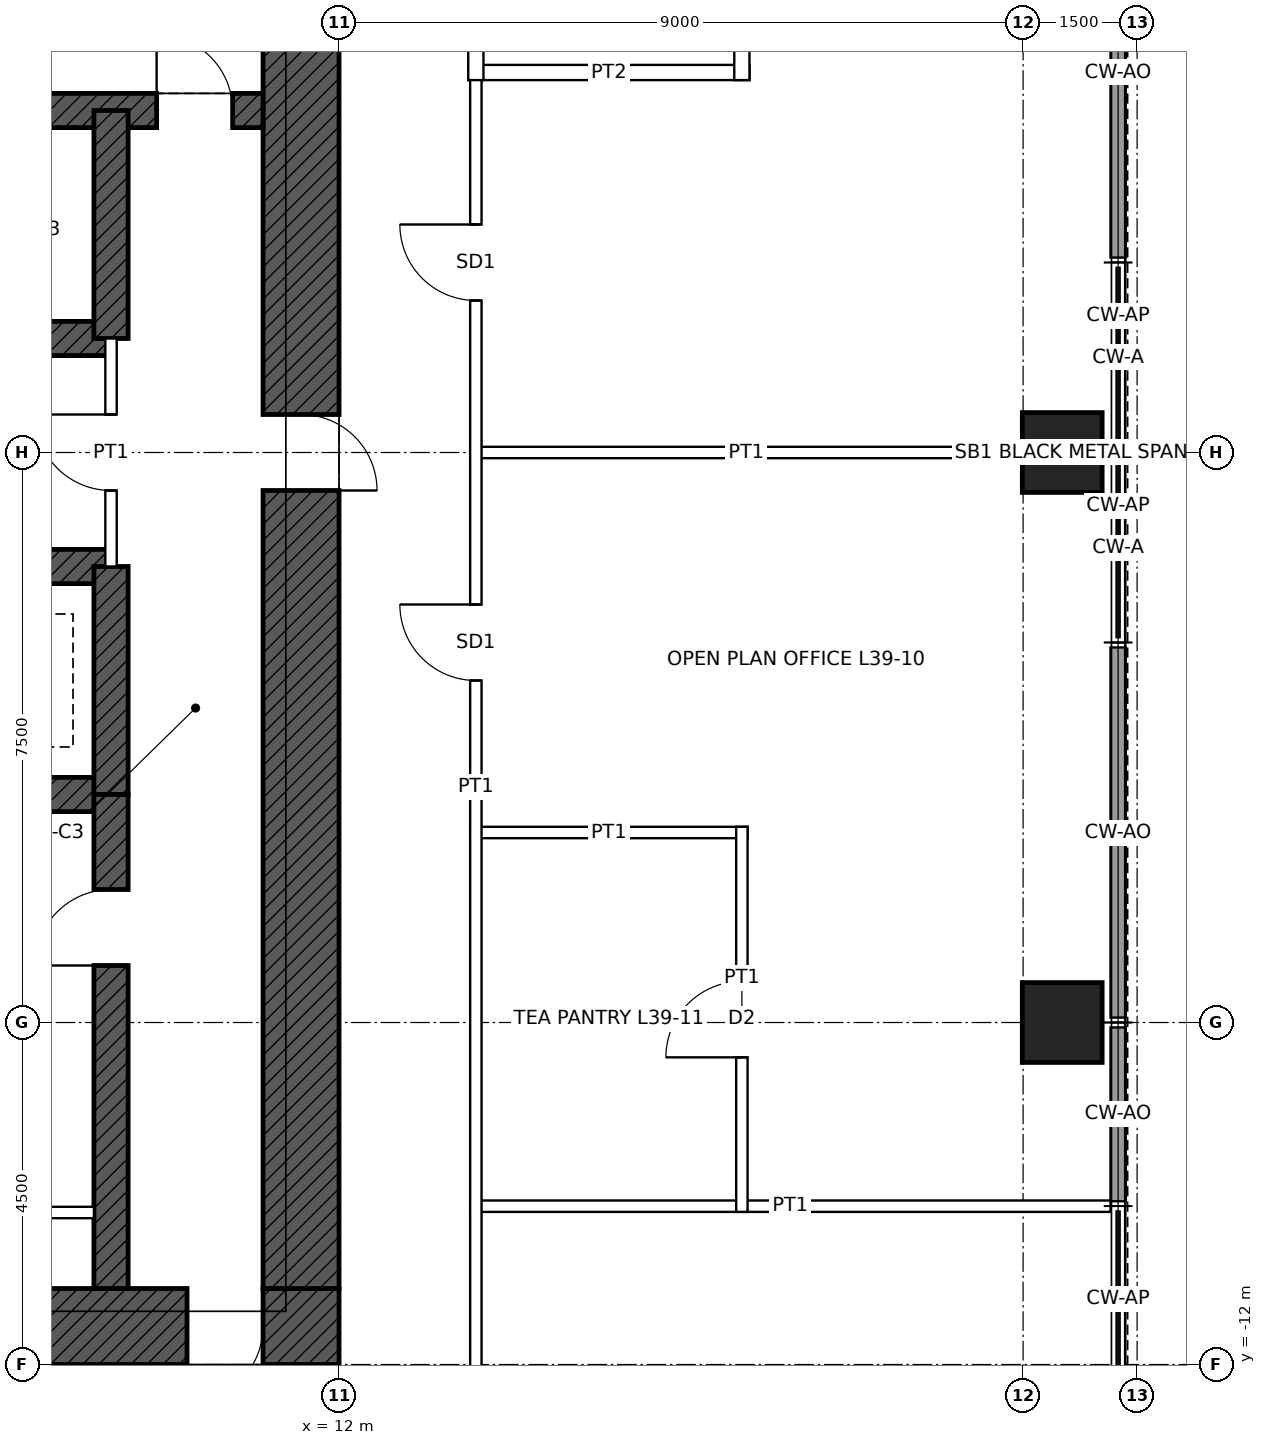
"""IFC4 building model, lengths in metres.
Left out: names, types, materials, properties, quantities, classifications, styles, units other than length and angle.
Written with IfcOpenShell. Run it as: python <this file> out.ifc"""

import sys

from ifc_helpers import new_model, si_unit, direction, frame, frame_2d, origin, origin_2d, place, context, subcontext, project, spatial, rectangle, hollow_rectangle, extrude, element, fill, save


model = new_model("IFC4")
c1 = context("Model", 3, precision=1e-05, world=origin(), true_north=direction((0.0, 1.0)))
c2 = subcontext(c1, "Body", "Model", "MODEL_VIEW")
j1 = project(units=[si_unit("LENGTHUNIT", "METRE"), si_unit("PLANEANGLEUNIT", "RADIAN")], contexts=[c1])
p1 = place(None, origin())
s1 = spatial("IfcSite", under=j1, at=p1, CompositionType="ELEMENT")
p2 = place(p1, origin())
s2 = spatial("IfcBuilding", under=s1, at=p2, CompositionType="ELEMENT")
p3 = place(p2, frame((0.0, 0.0, 189.9)))
s3 = spatial("IfcBuildingStorey", under=s2, at=p3, CompositionType="ELEMENT", Elevation=189.9)
for number, where, z_axis, x_axis in (
    (1, (21.515, 0.0, 0.0), (0.0, 0.0, 1.0), (1.0, 0.0, 0.0)),
    (2, (21.515, -7.5, 0.0), (0.0, 0.0, 1.0), (1.0, 0.0, 0.0)),
):
    element("IfcColumn", number, at=place(p3, frame(where, z_axis=z_axis, x_axis=x_axis)), inside=s3, PredefinedType="COLUMN", context=c2, shape_type="SweptSolid", body=[
        extrude(hollow_rectangle(XDim=1.05, YDim=1.05, WallThickness=0.07, at=origin_2d()), origin(), (0.0, 0.0, 1.0), 4.0),
    ])
p4 = place(p3, frame((12.0, -11.5, 0.0), z_axis=(0.0, 0.0, 1.0), x_axis=(-1.0, 0.0, 0.0)))
e3 = element("IfcWall", 3, at=p4, inside=s3, PredefinedType="SHEAR", context=c2, shape_type="SweptSolid", body=[
    extrude(rectangle(XDim=24.0, YDim=1.0, at=frame_2d((12.0, 0.0))), origin(), (0.0, 0.0, 1.0), 4.0),
])
p5 = place(p4, frame((11.5, 0.0, 0.0)))
e4 = element("IfcOpeningElement", 4, at=p5, cuts=e3, PredefinedType="OPENING", context=c2, shape_type="SweptSolid", body=[
    extrude(rectangle(XDim=1.0, YDim=2.1, at=frame_2d((0.5, 1.05))), frame((0.0, 0.51, 0.0), z_axis=(0.0, -1.0, 0.0), x_axis=(1.0, 0.0, 0.0)), (0.0, 0.0, 1.0), 1.02),
])
p6 = place(p4, frame((1.0, 0.0, 0.0)))
e5 = element("IfcOpeningElement", 5, at=p6, cuts=e3, PredefinedType="OPENING", context=c2, shape_type="SweptSolid", body=[
    extrude(rectangle(XDim=1.0, YDim=2.4, at=frame_2d((0.5, 1.2))), frame((0.0, 0.51, 0.0), z_axis=(0.0, -1.0, 0.0), x_axis=(1.0, 0.0, 0.0)), (0.0, 0.0, 1.0), 1.02),
])
p7 = place(p3, frame((11.5, 11.0, 0.0), z_axis=(0.0, 0.0, 1.0), x_axis=(0.0, -1.0, 0.0)))
e6 = element("IfcWall", 6, at=p7, inside=s3, PredefinedType="SHEAR", context=c2, shape_type="SweptSolid", body=[
    extrude(rectangle(XDim=22.0, YDim=1.0, at=frame_2d((11.0, 0.0))), origin(), (0.0, 0.0, 1.0), 4.0),
])
p8 = place(p7, frame((10.5, 0.0, 0.0)))
e7 = element("IfcOpeningElement", 7, at=p8, cuts=e6, PredefinedType="OPENING", context=c2, shape_type="SweptSolid", body=[
    extrude(rectangle(XDim=1.0, YDim=2.4, at=frame_2d((0.5, 1.2))), frame((0.0, 0.51, 0.0), z_axis=(0.0, -1.0, 0.0), x_axis=(1.0, 0.0, 0.0)), (0.0, 0.0, 1.0), 1.02),
])
p9 = place(p3, frame((-11.0, 4.5, 0.0), z_axis=(0.0, 0.0, 1.0), x_axis=(1.0, 0.0, 0.0)))
e8 = element("IfcWall", 8, at=p9, inside=s3, PredefinedType="SHEAR", context=c2, shape_type="SweptSolid", body=[
    extrude(rectangle(XDim=22.0, YDim=0.45, at=frame_2d((11.0, 0.0))), origin(), (0.0, 0.0, 1.0), 4.0),
])
p10 = place(p9, frame((0.4, 0.0, 0.0)))
e9 = element("IfcOpeningElement", 9, at=p10, cuts=e8, PredefinedType="OPENING", context=c2, shape_type="SweptSolid", body=[
    extrude(rectangle(XDim=1.0, YDim=2.1, at=frame_2d((0.5, 1.05))), frame((0.0, 0.235, 0.0), z_axis=(0.0, -1.0, 0.0), x_axis=(1.0, 0.0, 0.0)), (0.0, 0.0, 1.0), 0.47),
])
p11 = place(p9, frame((20.6, 0.0, 0.0)))
e10 = element("IfcOpeningElement", 10, at=p11, cuts=e8, PredefinedType="OPENING", context=c2, shape_type="SweptSolid", body=[
    extrude(rectangle(XDim=1.0, YDim=2.1, at=frame_2d((0.5, 1.05))), frame((0.0, 0.235, 0.0), z_axis=(0.0, -1.0, 0.0), x_axis=(1.0, 0.0, 0.0)), (0.0, 0.0, 1.0), 0.47),
])
p12 = place(p3, frame((-9.0, 1.5, 0.0), z_axis=(0.0, 0.0, 1.0), x_axis=(1.0, 0.0, 0.0)))
e11 = element("IfcWall", 11, at=p12, inside=s3, PredefinedType="SHEAR", context=c2, shape_type="SweptSolid", body=[
    extrude(rectangle(XDim=18.0, YDim=0.45, at=frame_2d((9.0, 0.0))), origin(), (0.0, 0.0, 1.0), 4.0),
])
p13 = place(p12, frame((0.95, 0.0, 0.0)))
e12 = element("IfcOpeningElement", 12, at=p13, cuts=e11, PredefinedType="OPENING", context=c2, shape_type="SweptSolid", body=[
    extrude(rectangle(XDim=1.1, YDim=2.1, at=frame_2d((0.55, 1.05))), frame((0.0, 0.235, 0.0), z_axis=(0.0, -1.0, 0.0), x_axis=(1.0, 0.0, 0.0)), (0.0, 0.0, 1.0), 0.47),
])
p14 = place(p12, frame((3.95, 0.0, 0.0)))
e13 = element("IfcOpeningElement", 13, at=p14, cuts=e11, PredefinedType="OPENING", context=c2, shape_type="SweptSolid", body=[
    extrude(rectangle(XDim=1.1, YDim=2.1, at=frame_2d((0.55, 1.05))), frame((0.0, 0.235, 0.0), z_axis=(0.0, -1.0, 0.0), x_axis=(1.0, 0.0, 0.0)), (0.0, 0.0, 1.0), 0.47),
])
p15 = place(p12, frame((6.95, 0.0, 0.0)))
e14 = element("IfcOpeningElement", 14, at=p15, cuts=e11, PredefinedType="OPENING", context=c2, shape_type="SweptSolid", body=[
    extrude(rectangle(XDim=1.1, YDim=2.1, at=frame_2d((0.55, 1.05))), frame((0.0, 0.235, 0.0), z_axis=(0.0, -1.0, 0.0), x_axis=(1.0, 0.0, 0.0)), (0.0, 0.0, 1.0), 0.47),
])
p16 = place(p12, frame((9.95, 0.0, 0.0)))
e15 = element("IfcOpeningElement", 15, at=p16, cuts=e11, PredefinedType="OPENING", context=c2, shape_type="SweptSolid", body=[
    extrude(rectangle(XDim=1.1, YDim=2.1, at=frame_2d((0.55, 1.05))), frame((0.0, 0.235, 0.0), z_axis=(0.0, -1.0, 0.0), x_axis=(1.0, 0.0, 0.0)), (0.0, 0.0, 1.0), 0.47),
])
p17 = place(p12, frame((12.95, 0.0, 0.0)))
e16 = element("IfcOpeningElement", 16, at=p17, cuts=e11, PredefinedType="OPENING", context=c2, shape_type="SweptSolid", body=[
    extrude(rectangle(XDim=1.1, YDim=2.1, at=frame_2d((0.55, 1.05))), frame((0.0, 0.235, 0.0), z_axis=(0.0, -1.0, 0.0), x_axis=(1.0, 0.0, 0.0)), (0.0, 0.0, 1.0), 0.47),
])
p18 = place(p12, frame((15.95, 0.0, 0.0)))
e17 = element("IfcOpeningElement", 17, at=p18, cuts=e11, PredefinedType="OPENING", context=c2, shape_type="SweptSolid", body=[
    extrude(rectangle(XDim=1.1, YDim=2.1, at=frame_2d((0.55, 1.05))), frame((0.0, 0.235, 0.0), z_axis=(0.0, -1.0, 0.0), x_axis=(1.0, 0.0, 0.0)), (0.0, 0.0, 1.0), 0.47),
])
p19 = place(p3, frame((-9.0, -1.5, 0.0), z_axis=(0.0, 0.0, 1.0), x_axis=(1.0, 0.0, 0.0)))
e18 = element("IfcWall", 18, at=p19, inside=s3, PredefinedType="SHEAR", context=c2, shape_type="SweptSolid", body=[
    extrude(rectangle(XDim=18.0, YDim=0.45, at=frame_2d((9.0, 0.0))), origin(), (0.0, 0.0, 1.0), 4.0),
])
p20 = place(p19, frame((0.95, 0.0, 0.0)))
e19 = element("IfcOpeningElement", 19, at=p20, cuts=e18, PredefinedType="OPENING", context=c2, shape_type="SweptSolid", body=[
    extrude(rectangle(XDim=1.1, YDim=2.1, at=frame_2d((0.55, 1.05))), frame((0.0, 0.235, 0.0), z_axis=(0.0, -1.0, 0.0), x_axis=(1.0, 0.0, 0.0)), (0.0, 0.0, 1.0), 0.47),
])
p21 = place(p19, frame((3.95, 0.0, 0.0)))
e20 = element("IfcOpeningElement", 20, at=p21, cuts=e18, PredefinedType="OPENING", context=c2, shape_type="SweptSolid", body=[
    extrude(rectangle(XDim=1.1, YDim=2.1, at=frame_2d((0.55, 1.05))), frame((0.0, 0.235, 0.0), z_axis=(0.0, -1.0, 0.0), x_axis=(1.0, 0.0, 0.0)), (0.0, 0.0, 1.0), 0.47),
])
p22 = place(p19, frame((6.95, 0.0, 0.0)))
e21 = element("IfcOpeningElement", 21, at=p22, cuts=e18, PredefinedType="OPENING", context=c2, shape_type="SweptSolid", body=[
    extrude(rectangle(XDim=1.1, YDim=2.1, at=frame_2d((0.55, 1.05))), frame((0.0, 0.235, 0.0), z_axis=(0.0, -1.0, 0.0), x_axis=(1.0, 0.0, 0.0)), (0.0, 0.0, 1.0), 0.47),
])
p23 = place(p3, frame((-9.0, -4.5, 0.0), z_axis=(0.0, 0.0, 1.0), x_axis=(1.0, 0.0, 0.0)))
e22 = element("IfcWall", 22, at=p23, inside=s3, PredefinedType="SHEAR", context=c2, shape_type="SweptSolid", body=[
    extrude(rectangle(XDim=18.0, YDim=0.45, at=frame_2d((9.0, 0.0))), origin(), (0.0, 0.0, 1.0), 4.0),
])
for number, where, z_axis, x_axis in (
    (23, (9.0, 1.5, 0.0), (0.0, 0.0, 1.0), (0.0, 1.0, 0.0)),
    (24, (9.0, -4.5, 0.0), (0.0, 0.0, 1.0), (0.0, 1.0, 0.0)),
):
    element("IfcWall", number, at=place(p3, frame(where, z_axis=z_axis, x_axis=x_axis)), inside=s3, PredefinedType="SHEAR", context=c2, shape_type="SweptSolid", body=[
        extrude(rectangle(XDim=3.0, YDim=0.45, at=frame_2d((1.5, 0.0))), origin(), (0.0, 0.0, 1.0), 4.0),
    ])
p24 = place(p3, frame((9.0, -11.0, 0.0), z_axis=(0.0, 0.0, 1.0), x_axis=(0.0, 1.0, 0.0)))
e25 = element("IfcWall", 25, at=p24, inside=s3, PredefinedType="SHEAR", context=c2, shape_type="SweptSolid", body=[
    extrude(rectangle(XDim=6.5, YDim=0.45, at=frame_2d((3.25, 0.0))), origin(), (0.0, 0.0, 1.0), 4.0),
])
p25 = place(p24, frame((4.25, 0.0, 0.0)))
e26 = element("IfcOpeningElement", 26, at=p25, cuts=e25, PredefinedType="OPENING", context=c2, shape_type="SweptSolid", body=[
    extrude(rectangle(XDim=1.0, YDim=2.1, at=frame_2d((0.5, 1.05))), frame((0.0, 0.235, 0.0), z_axis=(0.0, -1.0, 0.0), x_axis=(1.0, 0.0, 0.0)), (0.0, 0.0, 1.0), 0.47),
])
for number, where, z_axis, x_axis in (
    (27, (22.25, 7.435, 0.0), (0.0, 0.0, 1.0), (0.0, -1.0, 0.0)),
    (28, (22.25, 4.968, 0.0), (0.0, 0.0, 1.0), (0.0, -1.0, 0.0)),
    (29, (22.25, -2.565, 0.0), (0.0, 0.0, 1.0), (0.0, -1.0, 0.0)),
    (30, (22.25, -5.032, 0.0), (0.0, 0.0, 1.0), (0.0, -1.0, 0.0)),
):
    element("IfcWall", number, at=place(p3, frame(where, z_axis=z_axis, x_axis=x_axis)), inside=s3, PredefinedType="SOLIDWALL", context=c2, shape_type="SweptSolid", body=[
        extrude(rectangle(XDim=2.403, YDim=0.2, at=frame_2d((1.201, 0.0))), origin(), (0.0, 0.0, 1.0), 3.85),
    ])
p26 = place(p3, frame((22.25, -7.565, 0.0), z_axis=(0.0, 0.0, 1.0), x_axis=(0.0, -1.0, 0.0)))
e31 = element("IfcWall", 31, at=p26, inside=s3, PredefinedType="SOLIDWALL", context=c2, shape_type="SweptSolid", body=[
    extrude(rectangle(XDim=2.287, YDim=0.2, at=frame_2d((1.144, 0.0))), origin(), (0.0, 0.0, 1.0), 3.85),
])
p27 = place(p3, frame((13.725, -9.917, 0.0), z_axis=(0.0, 0.0, 1.0), x_axis=(1.0, 0.0, 0.0)))
e32 = element("IfcWall", 32, at=p27, inside=s3, PredefinedType="PARTITIONING", context=c2, shape_type="SweptSolid", body=[
    extrude(rectangle(XDim=8.425, YDim=0.15, at=frame_2d((4.212, 0.0))), origin(), (0.0, 0.0, 1.0), 3.85),
])
p28 = place(p3, frame((13.725, -5.0, 0.0), z_axis=(0.0, 0.0, 1.0), x_axis=(1.0, 0.0, 0.0)))
e33 = element("IfcWall", 33, at=p28, inside=s3, PredefinedType="PARTITIONING", context=c2, shape_type="SweptSolid", body=[
    extrude(rectangle(XDim=3.65, YDim=0.15, at=frame_2d((1.825, 0.0))), origin(), (0.0, 0.0, 1.0), 3.85),
])
p29 = place(p3, frame((13.725, 0.0, 0.0), z_axis=(0.0, 0.0, 1.0), x_axis=(1.0, 0.0, 0.0)))
e34 = element("IfcWall", 34, at=p29, inside=s3, PredefinedType="PARTITIONING", context=c2, shape_type="SweptSolid", body=[
    extrude(rectangle(XDim=7.265, YDim=0.15, at=frame_2d((3.632, 0.0))), origin(), (0.0, 0.0, 1.0), 3.238),
])
p30 = place(p3, frame((13.7, 5.0, 0.0), z_axis=(0.0, 0.0, 1.0), x_axis=(1.0, 0.0, 0.0)))
e35 = element("IfcWall", 35, at=p30, inside=s3, PredefinedType="PARTITIONING", context=c2, shape_type="SweptSolid", body=[
    extrude(rectangle(XDim=3.7, YDim=0.2, at=frame_2d((1.85, 0.0))), origin(), (0.0, 0.0, 1.0), 3.85),
])
p31 = place(p3, frame((13.8, -13.875, 0.0), z_axis=(0.0, 0.0, 1.0), x_axis=(0.0, 1.0, 0.0)))
e36 = element("IfcWall", 36, at=p31, inside=s3, PredefinedType="PARTITIONING", context=c2, shape_type="SweptSolid", body=[
    extrude(rectangle(XDim=18.95, YDim=0.15, at=frame_2d((9.475, 0.0))), origin(), (0.0, 0.0, 1.0), 3.85),
])
p32 = place(p31, frame((15.875, 0.0, 0.0)))
e37 = element("IfcOpeningElement", 37, at=p32, cuts=e36, PredefinedType="OPENING", context=c2, shape_type="SweptSolid", body=[
    extrude(rectangle(XDim=1.0, YDim=2.4, at=frame_2d((0.5, 1.2))), frame((0.0, 0.085, 0.0), z_axis=(0.0, -1.0, 0.0), x_axis=(1.0, 0.0, 0.0)), (0.0, 0.0, 1.0), 0.17),
])
p33 = place(p31, frame((10.875, 0.0, 0.0)))
e38 = element("IfcOpeningElement", 38, at=p33, cuts=e36, PredefinedType="OPENING", context=c2, shape_type="SweptSolid", body=[
    extrude(rectangle(XDim=1.0, YDim=2.4, at=frame_2d((0.5, 1.2))), frame((0.0, 0.085, 0.0), z_axis=(0.0, -1.0, 0.0), x_axis=(1.0, 0.0, 0.0)), (0.0, 0.0, 1.0), 0.17),
])
p34 = place(p3, frame((13.8, 4.9, 0.0), z_axis=(0.0, 0.0, 1.0), x_axis=(0.0, 1.0, 0.0)))
e39 = element("IfcWall", 39, at=p34, inside=s3, PredefinedType="PARTITIONING", context=c2, shape_type="SweptSolid", body=[
    extrude(rectangle(XDim=5.117, YDim=0.2, at=frame_2d((2.559, 0.0))), origin(), (0.0, 0.0, 1.0), 3.85),
])
p35 = place(p3, frame((17.3, -9.992, 0.0), z_axis=(0.0, 0.0, 1.0), x_axis=(0.0, 1.0, 0.0)))
e40 = element("IfcWall", 40, at=p35, inside=s3, PredefinedType="PARTITIONING", context=c2, shape_type="SweptSolid", body=[
    extrude(rectangle(XDim=5.067, YDim=0.15, at=frame_2d((2.533, 0.0))), origin(), (0.0, 0.0, 1.0), 3.85),
])
p36 = place(p35, frame((2.033, 0.0, 0.0)))
e41 = element("IfcOpeningElement", 41, at=p36, cuts=e40, PredefinedType="OPENING", context=c2, shape_type="SweptSolid", body=[
    extrude(rectangle(XDim=1.0, YDim=2.1, at=frame_2d((0.5, 1.05))), frame((0.0, 0.085, 0.0), z_axis=(0.0, -1.0, 0.0), x_axis=(1.0, 0.0, 0.0)), (0.0, 0.0, 1.0), 0.17),
])
p37 = place(p3, frame((17.3, 4.9, 0.0), z_axis=(0.0, 0.0, 1.0), x_axis=(0.0, 1.0, 0.0)))
e42 = element("IfcWall", 42, at=p37, inside=s3, PredefinedType="PARTITIONING", context=c2, shape_type="SweptSolid", body=[
    extrude(rectangle(XDim=5.117, YDim=0.2, at=frame_2d((2.559, 0.0))), origin(), (0.0, 0.0, 1.0), 3.85),
])
p38 = place(p37, frame((2.059, 0.0, 0.0)))
e43 = element("IfcOpeningElement", 43, at=p38, cuts=e42, PredefinedType="OPENING", context=c2, shape_type="SweptSolid", body=[
    extrude(rectangle(XDim=1.0, YDim=2.1, at=frame_2d((0.5, 1.05))), frame((0.0, 0.11, 0.0), z_axis=(0.0, -1.0, 0.0), x_axis=(1.0, 0.0, 0.0)), (0.0, 0.0, 1.0), 0.22),
])
p39 = place(p3, frame((3.225, -10.0, 0.0), z_axis=(0.0, 0.0, 1.0), x_axis=(1.0, 0.0, 0.0)))
e44 = element("IfcWall", 44, at=p39, inside=s3, PredefinedType="PARTITIONING", context=c2, shape_type="SweptSolid", body=[
    extrude(rectangle(XDim=5.55, YDim=0.15, at=frame_2d((2.775, 0.0))), origin(), (0.0, 0.0, 1.0), 3.75),
])
p40 = place(p39, frame((2.275, 0.0, 0.0)))
e45 = element("IfcOpeningElement", 45, at=p40, cuts=e44, PredefinedType="OPENING", context=c2, shape_type="SweptSolid", body=[
    extrude(rectangle(XDim=1.0, YDim=2.1, at=frame_2d((0.5, 1.05))), frame((0.0, 0.085, 0.0), z_axis=(0.0, -1.0, 0.0), x_axis=(1.0, 0.0, 0.0)), (0.0, 0.0, 1.0), 0.17),
])
p41 = place(p3, frame((9.0, -1.5, 0.0), z_axis=(0.0, 0.0, 1.0), x_axis=(0.0, 1.0, 0.0)))
e46 = element("IfcWall", 46, at=p41, inside=s3, PredefinedType="PARTITIONING", context=c2, shape_type="SweptSolid", body=[
    extrude(rectangle(XDim=3.0, YDim=0.15, at=frame_2d((1.5, 0.0))), origin(), (0.0, 0.0, 1.0), 3.75),
])
p42 = place(p41, frame((1.0, 0.0, 0.0)))
e47 = element("IfcOpeningElement", 47, at=p42, cuts=e46, PredefinedType="OPENING", context=c2, shape_type="SweptSolid", body=[
    extrude(rectangle(XDim=1.0, YDim=2.4, at=frame_2d((0.5, 1.2))), frame((0.0, 0.085, 0.0), z_axis=(0.0, -1.0, 0.0), x_axis=(1.0, 0.0, 0.0)), (0.0, 0.0, 1.0), 0.17),
])
p43 = place(p11, origin())
e48 = element("IfcDoor", 48, at=p43, inside=s3, OperationType="SINGLE_SWING_LEFT", PredefinedType="DOOR", context=c2, shape_type="SweptSolid", body=[
    extrude(rectangle(XDim=1.0, YDim=2.1, at=frame_2d((0.5, 1.05))), frame((0.0, 0.025, 0.0), z_axis=(0.0, -1.0, 0.0), x_axis=(1.0, 0.0, 0.0)), (0.0, 0.0, 1.0), 0.05),
])
fill(e10, e48)
p44 = place(p8, origin())
e49 = element("IfcDoor", 49, at=p44, inside=s3, OperationType="SINGLE_SWING_RIGHT", PredefinedType="DOOR", context=c2, shape_type="SweptSolid", body=[
    extrude(rectangle(XDim=1.0, YDim=2.4, at=frame_2d((0.5, 1.2))), frame((0.0, 0.485, 0.0), z_axis=(0.0, -1.0, 0.0), x_axis=(1.0, 0.0, 0.0)), (0.0, 0.0, 1.0), 0.05),
])
fill(e7, e49)
p45 = place(p6, origin())
e50 = element("IfcDoor", 50, at=p45, inside=s3, OperationType="SINGLE_SWING_RIGHT", PredefinedType="DOOR", context=c2, shape_type="SweptSolid", body=[
    extrude(rectangle(XDim=1.0, YDim=2.4, at=frame_2d((0.5, 1.2))), frame((0.0, 0.485, 0.0), z_axis=(0.0, -1.0, 0.0), x_axis=(1.0, 0.0, 0.0)), (0.0, 0.0, 1.0), 0.05),
])
fill(e5, e50)
p46 = place(p25, origin())
e51 = element("IfcDoor", 51, at=p46, inside=s3, OperationType="SINGLE_SWING_LEFT", PredefinedType="DOOR", context=c2, shape_type="SweptSolid", body=[
    extrude(rectangle(XDim=1.0, YDim=2.1, at=frame_2d((0.5, 1.05))), frame((0.0, 0.025, 0.0), z_axis=(0.0, -1.0, 0.0), x_axis=(1.0, 0.0, 0.0)), (0.0, 0.0, 1.0), 0.05),
])
fill(e26, e51)
p47 = place(p42, origin())
e52 = element("IfcDoor", 52, at=p47, inside=s3, OperationType="SINGLE_SWING_RIGHT", PredefinedType="DOOR", context=c2, shape_type="SweptSolid", body=[
    extrude(rectangle(XDim=1.0, YDim=2.4, at=frame_2d((0.5, 1.2))), frame((0.0, 0.025, 0.0), z_axis=(0.0, -1.0, 0.0), x_axis=(1.0, 0.0, 0.0)), (0.0, 0.0, 1.0), 0.05),
])
fill(e47, e52)
p48 = place(p32, origin())
e53 = element("IfcDoor", 53, at=p48, inside=s3, OperationType="SINGLE_SWING_RIGHT", PredefinedType="DOOR", context=c2, shape_type="SweptSolid", body=[
    extrude(rectangle(XDim=1.0, YDim=2.4, at=frame_2d((0.5, 1.2))), frame((0.0, 0.025, 0.0), z_axis=(0.0, -1.0, 0.0), x_axis=(1.0, 0.0, 0.0)), (0.0, 0.0, 1.0), 0.05),
])
fill(e37, e53)
p49 = place(p33, origin())
e54 = element("IfcDoor", 54, at=p49, inside=s3, OperationType="SINGLE_SWING_RIGHT", PredefinedType="DOOR", context=c2, shape_type="SweptSolid", body=[
    extrude(rectangle(XDim=1.0, YDim=2.4, at=frame_2d((0.5, 1.2))), frame((0.0, 0.025, 0.0), z_axis=(0.0, -1.0, 0.0), x_axis=(1.0, 0.0, 0.0)), (0.0, 0.0, 1.0), 0.05),
])
fill(e38, e54)
p50 = place(p36, origin())
e55 = element("IfcDoor", 55, at=p50, inside=s3, OperationType="SINGLE_SWING_LEFT", PredefinedType="DOOR", context=c2, shape_type="SweptSolid", body=[
    extrude(rectangle(XDim=1.0, YDim=2.1, at=frame_2d((0.5, 1.05))), frame((0.0, 0.025, 0.0), z_axis=(0.0, -1.0, 0.0), x_axis=(1.0, 0.0, 0.0)), (0.0, 0.0, 1.0), 0.05),
])
fill(e41, e55)
save(model, sys.argv[1])
